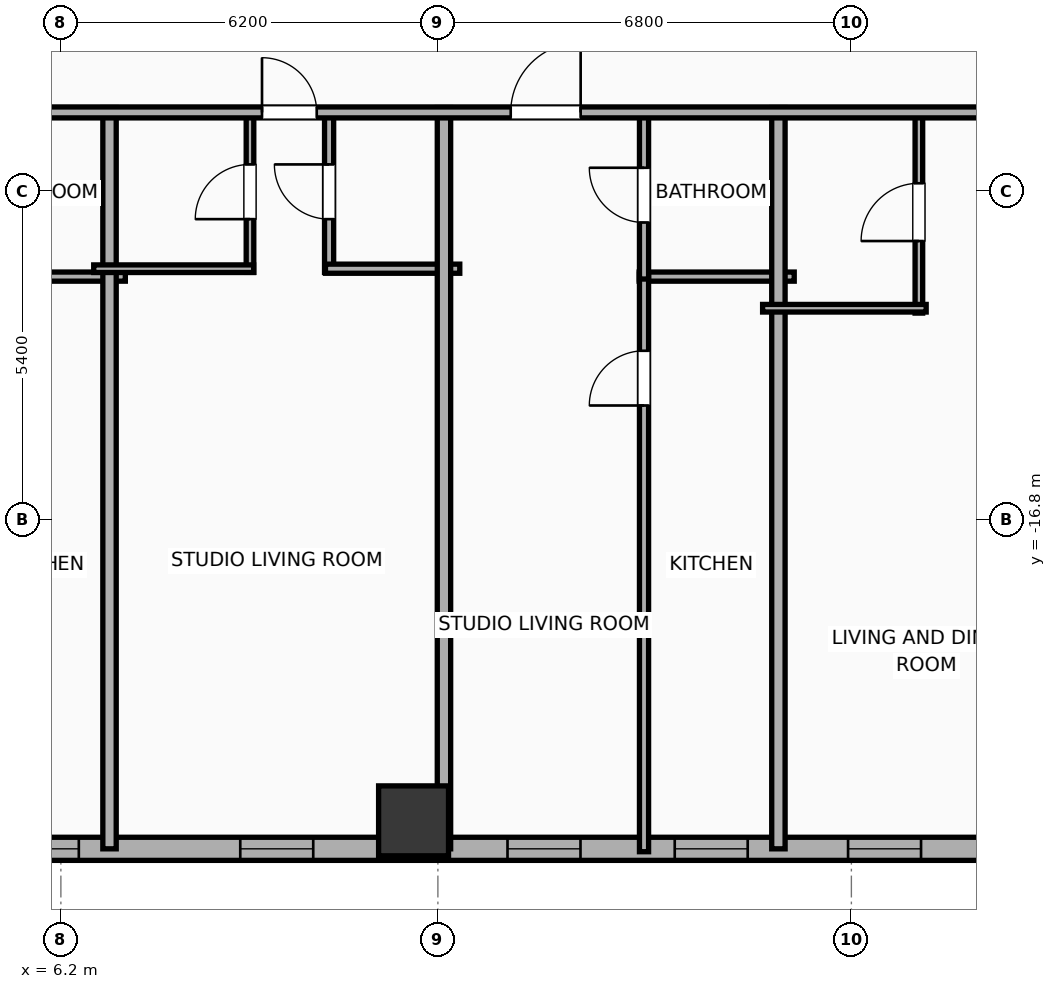
"""IFC4 building model, lengths in metres.
Left out: names, types, materials, properties, quantities, classifications, styles, units other than length and angle.
Written with IfcOpenShell. Run it as: python <this file> out.ifc"""

import sys

from ifc_helpers import new_model, si_unit, direction, frame, frame_2d, origin, origin_2d, place, context, subcontext, project, spatial, rectangle, hollow_rectangle, extrude, element, fill, save


model = new_model("IFC4")
c1 = context("Model", 3, precision=1e-05, world=origin(), true_north=direction((0.0, 1.0)))
c2 = subcontext(c1, "Body", "Model", "MODEL_VIEW")
j1 = project(units=[si_unit("LENGTHUNIT", "METRE"), si_unit("PLANEANGLEUNIT", "RADIAN")], contexts=[c1])
p1 = place(None, origin())
s1 = spatial("IfcSite", under=j1, at=p1, CompositionType="ELEMENT")
p2 = place(p1, origin())
s2 = spatial("IfcBuilding", under=s1, at=p2, CompositionType="ELEMENT")
p3 = place(p2, frame((0.0, 0.0, 33.8)))
s3 = spatial("IfcBuildingStorey", under=s2, at=p3, CompositionType="ELEMENT", Elevation=33.8)
p4 = place(p3, frame((12.0, -21.75, 0.0), z_axis=(0.0, 0.0, 1.0), x_axis=(1.0, 0.0, 0.0)))
e1 = element("IfcColumn", 1, at=p4, inside=s3, PredefinedType="COLUMN", context=c2, shape_type="SweptSolid", body=[
    extrude(hollow_rectangle(XDim=1.15, YDim=1.15, WallThickness=0.04, at=origin_2d()), origin(), (0.0, 0.0, 1.0), 3.9),
])
p5 = place(p3, frame((22.381, -22.21, 0.0), z_axis=(0.0, 0.0, 1.0), x_axis=(-1.0, 0.0, 0.0)))
e2 = element("IfcWall", 2, at=p5, inside=s3, PredefinedType="ELEMENTEDWALL", context=c2, shape_type="SweptSolid", body=[
    extrude(rectangle(XDim=51.963, YDim=0.38, at=frame_2d((25.981, 0.0))), origin(), (0.0, 0.0, 1.0), 3.65),
])
p6 = place(p5, frame((49.127, 0.0, 0.75)))
e3 = element("IfcOpeningElement", 3, at=p6, cuts=e2, PredefinedType="OPENING", context=c2, shape_type="SweptSolid", body=[
    extrude(rectangle(XDim=1.2, YDim=2.05, at=frame_2d((0.6, 1.025))), frame((0.0, 0.2, 0.0), z_axis=(0.0, -1.0, 0.0), x_axis=(1.0, 0.0, 0.0)), (0.0, 0.0, 1.0), 0.4),
])
p7 = place(p5, frame((43.926, 0.0, 0.75)))
e4 = element("IfcOpeningElement", 4, at=p7, cuts=e2, PredefinedType="OPENING", context=c2, shape_type="SweptSolid", body=[
    extrude(rectangle(XDim=1.2, YDim=2.05, at=frame_2d((0.6, 1.025))), frame((0.0, 0.2, 0.0), z_axis=(0.0, -1.0, 0.0), x_axis=(1.0, 0.0, 0.0)), (0.0, 0.0, 1.0), 0.4),
])
p8 = place(p5, frame((46.676, 0.0, 0.75)))
e5 = element("IfcOpeningElement", 5, at=p8, cuts=e2, PredefinedType="OPENING", context=c2, shape_type="SweptSolid", body=[
    extrude(rectangle(XDim=1.2, YDim=2.05, at=frame_2d((0.6, 1.025))), frame((0.0, 0.2, 0.0), z_axis=(0.0, -1.0, 0.0), x_axis=(1.0, 0.0, 0.0)), (0.0, 0.0, 1.0), 0.4),
])
p9 = place(p5, frame((39.531, 0.0, 0.75)))
e6 = element("IfcOpeningElement", 6, at=p9, cuts=e2, PredefinedType="OPENING", context=c2, shape_type="SweptSolid", body=[
    extrude(rectangle(XDim=1.2, YDim=2.05, at=frame_2d((0.6, 1.025))), frame((0.0, 0.2, 0.0), z_axis=(0.0, -1.0, 0.0), x_axis=(1.0, 0.0, 0.0)), (0.0, 0.0, 1.0), 0.4),
])
p10 = place(p5, frame((32.926, 0.0, 0.75)))
e7 = element("IfcOpeningElement", 7, at=p10, cuts=e2, PredefinedType="OPENING", context=c2, shape_type="SweptSolid", body=[
    extrude(rectangle(XDim=1.2, YDim=2.05, at=frame_2d((0.6, 1.025))), frame((0.0, 0.2, 0.0), z_axis=(0.0, -1.0, 0.0), x_axis=(1.0, 0.0, 0.0)), (0.0, 0.0, 1.0), 0.4),
])
p11 = place(p5, frame((35.676, 0.0, 0.75)))
e8 = element("IfcOpeningElement", 8, at=p11, cuts=e2, PredefinedType="OPENING", context=c2, shape_type="SweptSolid", body=[
    extrude(rectangle(XDim=1.2, YDim=2.05, at=frame_2d((0.6, 1.025))), frame((0.0, 0.2, 0.0), z_axis=(0.0, -1.0, 0.0), x_axis=(1.0, 0.0, 0.0)), (0.0, 0.0, 1.0), 0.4),
])
p12 = place(p5, frame((28.531, 0.0, 0.75)))
e9 = element("IfcOpeningElement", 9, at=p12, cuts=e2, PredefinedType="OPENING", context=c2, shape_type="SweptSolid", body=[
    extrude(rectangle(XDim=1.2, YDim=2.05, at=frame_2d((0.6, 1.025))), frame((0.0, 0.2, 0.0), z_axis=(0.0, -1.0, 0.0), x_axis=(1.0, 0.0, 0.0)), (0.0, 0.0, 1.0), 0.4),
])
p13 = place(p5, frame((21.926, 0.0, 0.75)))
e10 = element("IfcOpeningElement", 10, at=p13, cuts=e2, PredefinedType="OPENING", context=c2, shape_type="SweptSolid", body=[
    extrude(rectangle(XDim=1.2, YDim=2.05, at=frame_2d((0.6, 1.025))), frame((0.0, 0.2, 0.0), z_axis=(0.0, -1.0, 0.0), x_axis=(1.0, 0.0, 0.0)), (0.0, 0.0, 1.0), 0.4),
])
p14 = place(p5, frame((24.676, 0.0, 0.75)))
e11 = element("IfcOpeningElement", 11, at=p14, cuts=e2, PredefinedType="OPENING", context=c2, shape_type="SweptSolid", body=[
    extrude(rectangle(XDim=1.2, YDim=2.05, at=frame_2d((0.6, 1.025))), frame((0.0, 0.2, 0.0), z_axis=(0.0, -1.0, 0.0), x_axis=(1.0, 0.0, 0.0)), (0.0, 0.0, 1.0), 0.4),
])
p15 = place(p5, frame((18.636, 0.0, 0.75)))
e12 = element("IfcOpeningElement", 12, at=p15, cuts=e2, PredefinedType="OPENING", context=c2, shape_type="SweptSolid", body=[
    extrude(rectangle(XDim=1.2, YDim=2.05, at=frame_2d((0.6, 1.025))), frame((0.0, 0.2, 0.0), z_axis=(0.0, -1.0, 0.0), x_axis=(1.0, 0.0, 0.0)), (0.0, 0.0, 1.0), 0.4),
])
p16 = place(p5, frame((15.886, 0.0, 0.75)))
e13 = element("IfcOpeningElement", 13, at=p16, cuts=e2, PredefinedType="OPENING", context=c2, shape_type="SweptSolid", body=[
    extrude(rectangle(XDim=1.2, YDim=2.05, at=frame_2d((0.6, 1.025))), frame((0.0, 0.2, 0.0), z_axis=(0.0, -1.0, 0.0), x_axis=(1.0, 0.0, 0.0)), (0.0, 0.0, 1.0), 0.4),
])
p17 = place(p5, frame((12.031, 0.0, 0.75)))
e14 = element("IfcOpeningElement", 14, at=p17, cuts=e2, PredefinedType="OPENING", context=c2, shape_type="SweptSolid", body=[
    extrude(rectangle(XDim=1.2, YDim=2.05, at=frame_2d((0.6, 1.025))), frame((0.0, 0.2, 0.0), z_axis=(0.0, -1.0, 0.0), x_axis=(1.0, 0.0, 0.0)), (0.0, 0.0, 1.0), 0.4),
])
p18 = place(p5, frame((7.636, 0.0, 0.75)))
e15 = element("IfcOpeningElement", 15, at=p18, cuts=e2, PredefinedType="OPENING", context=c2, shape_type="SweptSolid", body=[
    extrude(rectangle(XDim=1.2, YDim=2.05, at=frame_2d((0.6, 1.025))), frame((0.0, 0.2, 0.0), z_axis=(0.0, -1.0, 0.0), x_axis=(1.0, 0.0, 0.0)), (0.0, 0.0, 1.0), 0.4),
])
p19 = place(p5, frame((4.886, 0.0, 0.75)))
e16 = element("IfcOpeningElement", 16, at=p19, cuts=e2, PredefinedType="OPENING", context=c2, shape_type="SweptSolid", body=[
    extrude(rectangle(XDim=1.2, YDim=2.05, at=frame_2d((0.6, 1.025))), frame((0.0, 0.2, 0.0), z_axis=(0.0, -1.0, 0.0), x_axis=(1.0, 0.0, 0.0)), (0.0, 0.0, 1.0), 0.4),
])
p20 = place(p5, frame((2.036, 0.0, 0.75)))
e17 = element("IfcOpeningElement", 17, at=p20, cuts=e2, PredefinedType="OPENING", context=c2, shape_type="SweptSolid", body=[
    extrude(rectangle(XDim=1.2, YDim=2.05, at=frame_2d((0.6, 1.025))), frame((0.0, 0.2, 0.0), z_axis=(0.0, -1.0, 0.0), x_axis=(1.0, 0.0, 0.0)), (0.0, 0.0, 1.0), 0.4),
])
p21 = place(p3, frame((4.71, -12.8, 0.0), z_axis=(0.0, 0.0, 1.0), x_axis=(1.0, 0.0, 0.0)))
e18 = element("IfcWall", 18, at=p21, inside=s3, PredefinedType="PLUMBINGWALL", context=c2, shape_type="SweptSolid", body=[
    extrude(rectangle(XDim=2.55, YDim=0.15, at=frame_2d((1.275, 0.0))), origin(), (0.0, 0.0, 1.0), 3.65),
])
p22 = place(p3, frame((7.0, -22.21, 0.0), z_axis=(0.0, 0.0, 1.0), x_axis=(0.0, 1.0, 0.0)))
e19 = element("IfcWall", 19, at=p22, inside=s3, PredefinedType="PARTITIONING", context=c2, shape_type="SweptSolid", body=[
    extrude(rectangle(XDim=12.19, YDim=0.22, at=frame_2d((6.095, 0.0))), origin(), (0.0, 0.0, 1.0), 3.65),
])
p23 = place(p3, frame((9.31, -12.73, 0.0), z_axis=(0.0, 0.0, 1.0), x_axis=(0.0, 1.0, 0.0)))
e20 = element("IfcWall", 20, at=p23, inside=s3, PredefinedType="PARTITIONING", context=c2, shape_type="SweptSolid", body=[
    extrude(rectangle(XDim=2.65, YDim=0.125, at=frame_2d((1.325, 0.0))), origin(), (0.0, 0.0, 1.0), 3.65),
])
p24 = place(p23, frame((0.875, 0.0, 0.0)))
e21 = element("IfcOpeningElement", 21, at=p24, cuts=e20, PredefinedType="OPENING", context=c2, shape_type="SweptSolid", body=[
    extrude(rectangle(XDim=0.9, YDim=2.05, at=frame_2d((0.45, 1.025))), frame((0.0, 0.073, 0.0), z_axis=(0.0, -1.0, 0.0), x_axis=(1.0, 0.0, 0.0)), (0.0, 0.0, 1.0), 0.145),
])
p25 = place(p3, frame((10.611, -12.73, 0.0), z_axis=(0.0, 0.0, 1.0), x_axis=(0.0, 1.0, 0.0)))
e22 = element("IfcWall", 22, at=p25, inside=s3, PredefinedType="PLUMBINGWALL", context=c2, shape_type="SweptSolid", body=[
    extrude(rectangle(XDim=2.65, YDim=0.15, at=frame_2d((1.325, 0.0))), origin(), (0.0, 0.0, 1.0), 3.65),
])
p26 = place(p25, frame((0.875, 0.0, 0.0)))
e23 = element("IfcOpeningElement", 23, at=p26, cuts=e22, PredefinedType="OPENING", context=c2, shape_type="SweptSolid", body=[
    extrude(rectangle(XDim=0.9, YDim=2.05, at=frame_2d((0.45, 1.025))), frame((0.0, 0.085, 0.0), z_axis=(0.0, -1.0, 0.0), x_axis=(1.0, 0.0, 0.0)), (0.0, 0.0, 1.0), 0.17),
])
p27 = place(p3, frame((6.74, -12.67, 0.0), z_axis=(0.0, 0.0, 1.0), x_axis=(1.0, 0.0, 0.0)))
e24 = element("IfcWall", 24, at=p27, inside=s3, PredefinedType="PARTITIONING", context=c2, shape_type="SweptSolid", body=[
    extrude(rectangle(XDim=2.63, YDim=0.125, at=frame_2d((1.315, 0.0))), origin(), (0.0, 0.0, 1.0), 3.65),
])
p28 = place(p3, frame((10.551, -12.67, 0.0), z_axis=(0.0, 0.0, 1.0), x_axis=(1.0, 0.0, 0.0)))
e25 = element("IfcWall", 25, at=p28, inside=s3, PredefinedType="PLUMBINGWALL", context=c2, shape_type="SweptSolid", body=[
    extrude(rectangle(XDim=2.209, YDim=0.15, at=frame_2d((1.104, 0.0))), origin(), (0.0, 0.0, 1.0), 3.65),
])
p29 = place(p3, frame((12.5, -22.21, 0.0), z_axis=(0.0, 0.0, 1.0), x_axis=(0.0, 1.0, 0.0)))
e26 = element("IfcWall", 26, at=p29, inside=s3, PredefinedType="PARTITIONING", context=c2, shape_type="SweptSolid", body=[
    extrude(rectangle(XDim=12.19, YDim=0.22, at=frame_2d((6.095, 0.0))), origin(), (0.0, 0.0, 1.0), 2.94),
])
p30 = place(p3, frame((15.71, -12.8, 0.0), z_axis=(0.0, 0.0, 1.0), x_axis=(1.0, 0.0, 0.0)))
e27 = element("IfcWall", 27, at=p30, inside=s3, PredefinedType="PLUMBINGWALL", context=c2, shape_type="SweptSolid", body=[
    extrude(rectangle(XDim=2.55, YDim=0.15, at=frame_2d((1.275, 0.0))), origin(), (0.0, 0.0, 1.0), 3.65),
])
p31 = place(p3, frame((15.79, -22.258, 0.0), z_axis=(0.0, 0.0, 1.0), x_axis=(0.0, 1.0, 0.0)))
e28 = element("IfcWall", 28, at=p31, inside=s3, PredefinedType="PLUMBINGWALL", context=c2, shape_type="SweptSolid", body=[
    extrude(rectangle(XDim=9.498, YDim=0.15, at=frame_2d((4.749, 0.0))), origin(), (0.0, 0.0, 1.0), 3.65),
])
p32 = place(p31, frame((7.338, 0.0, 0.0)))
e29 = element("IfcOpeningElement", 29, at=p32, cuts=e28, PredefinedType="OPENING", context=c2, shape_type="SweptSolid", body=[
    extrude(rectangle(XDim=0.9, YDim=2.05, at=frame_2d((0.45, 1.025))), frame((0.0, 0.085, 0.0), z_axis=(0.0, -1.0, 0.0), x_axis=(1.0, 0.0, 0.0)), (0.0, 0.0, 1.0), 0.17),
])
p33 = place(p3, frame((15.79, -12.84, 0.0), z_axis=(0.0, 0.0, 1.0), x_axis=(0.0, 1.0, 0.0)))
e30 = element("IfcWall", 30, at=p33, inside=s3, PredefinedType="PLUMBINGWALL", context=c2, shape_type="SweptSolid", body=[
    extrude(rectangle(XDim=2.76, YDim=0.15, at=frame_2d((1.38, 0.0))), origin(), (0.0, 0.0, 1.0), 3.65),
])
p34 = place(p33, frame((0.93, 0.0, 0.0)))
e31 = element("IfcOpeningElement", 31, at=p34, cuts=e30, PredefinedType="OPENING", context=c2, shape_type="SweptSolid", body=[
    extrude(rectangle(XDim=0.9, YDim=2.05, at=frame_2d((0.45, 1.025))), frame((0.0, 0.085, 0.0), z_axis=(0.0, -1.0, 0.0), x_axis=(1.0, 0.0, 0.0)), (0.0, 0.0, 1.0), 0.17),
])
p35 = place(p3, frame((18.0, -22.21, 0.0), z_axis=(0.0, 0.0, 1.0), x_axis=(0.0, 1.0, 0.0)))
e32 = element("IfcWall", 32, at=p35, inside=s3, PredefinedType="PARTITIONING", context=c2, shape_type="SweptSolid", body=[
    extrude(rectangle(XDim=12.19, YDim=0.22, at=frame_2d((6.095, 0.0))), origin(), (0.0, 0.0, 1.0), 3.65),
])
p36 = place(p3, frame((20.31, -13.4, 0.0), z_axis=(0.0, 0.0, 1.0), x_axis=(0.0, 1.0, 0.0)))
e33 = element("IfcWall", 33, at=p36, inside=s3, PredefinedType="PARTITIONING", context=c2, shape_type="SweptSolid", body=[
    extrude(rectangle(XDim=3.32, YDim=0.125, at=frame_2d((1.66, 0.0))), origin(), (0.0, 0.0, 1.0), 2.94),
])
p37 = place(p36, frame((1.185, 0.0, 0.0)))
e34 = element("IfcOpeningElement", 34, at=p37, cuts=e33, PredefinedType="OPENING", context=c2, shape_type="SweptSolid", body=[
    extrude(rectangle(XDim=0.95, YDim=2.05, at=frame_2d((0.475, 1.025))), frame((0.0, 0.073, 0.0), z_axis=(0.0, -1.0, 0.0), x_axis=(1.0, 0.0, 0.0)), (0.0, 0.0, 1.0), 0.145),
])
p38 = place(p3, frame((17.74, -13.32, 0.0), z_axis=(0.0, 0.0, 1.0), x_axis=(1.0, 0.0, 0.0)))
e35 = element("IfcWall", 35, at=p38, inside=s3, PredefinedType="PARTITIONING", context=c2, shape_type="SweptSolid", body=[
    extrude(rectangle(XDim=2.69, YDim=0.125, at=frame_2d((1.345, 0.0))), origin(), (0.0, 0.0, 1.0), 3.65),
])
p39 = place(p3, frame((-33.41, -10.1, 0.0), z_axis=(0.0, 0.0, 1.0), x_axis=(1.0, 0.0, 0.0)))
e36 = element("IfcWall", 36, at=p39, inside=s3, PredefinedType="PARTITIONING", context=c2, shape_type="SweptSolid", body=[
    extrude(rectangle(XDim=59.62, YDim=0.18, at=frame_2d((29.81, 0.0))), origin(), (0.0, 0.0, 1.0), 3.65),
])
p40 = place(p39, frame((3.259, 0.0, 0.0)))
e37 = element("IfcOpeningElement", 37, at=p40, cuts=e36, PredefinedType="OPENING", context=c2, shape_type="SweptSolid", body=[
    extrude(rectangle(XDim=1.15, YDim=2.05, at=frame_2d((0.575, 1.025))), frame((0.0, 0.1, 0.0), z_axis=(0.0, -1.0, 0.0), x_axis=(1.0, 0.0, 0.0)), (0.0, 0.0, 1.0), 0.2),
])
p41 = place(p39, frame((10.657, 0.0, 0.0)))
e38 = element("IfcOpeningElement", 38, at=p41, cuts=e36, PredefinedType="OPENING", context=c2, shape_type="SweptSolid", body=[
    extrude(rectangle(XDim=1.15, YDim=2.05, at=frame_2d((0.575, 1.025))), frame((0.0, 0.1, 0.0), z_axis=(0.0, -1.0, 0.0), x_axis=(1.0, 0.0, 0.0)), (0.0, 0.0, 1.0), 0.2),
])
p42 = place(p39, frame((15.421, 0.0, 0.0)))
e39 = element("IfcOpeningElement", 39, at=p42, cuts=e36, PredefinedType="OPENING", context=c2, shape_type="SweptSolid", body=[
    extrude(rectangle(XDim=0.9, YDim=2.05, at=frame_2d((0.45, 1.025))), frame((0.0, 0.1, 0.0), z_axis=(0.0, -1.0, 0.0), x_axis=(1.0, 0.0, 0.0)), (0.0, 0.0, 1.0), 0.2),
])
p43 = place(p39, frame((21.657, 0.0, 0.0)))
e40 = element("IfcOpeningElement", 40, at=p43, cuts=e36, PredefinedType="OPENING", context=c2, shape_type="SweptSolid", body=[
    extrude(rectangle(XDim=1.15, YDim=2.05, at=frame_2d((0.575, 1.025))), frame((0.0, 0.1, 0.0), z_axis=(0.0, -1.0, 0.0), x_axis=(1.0, 0.0, 0.0)), (0.0, 0.0, 1.0), 0.2),
])
p44 = place(p39, frame((26.421, 0.0, 0.0)))
e41 = element("IfcOpeningElement", 41, at=p44, cuts=e36, PredefinedType="OPENING", context=c2, shape_type="SweptSolid", body=[
    extrude(rectangle(XDim=0.9, YDim=2.05, at=frame_2d((0.45, 1.025))), frame((0.0, 0.1, 0.0), z_axis=(0.0, -1.0, 0.0), x_axis=(1.0, 0.0, 0.0)), (0.0, 0.0, 1.0), 0.2),
])
p45 = place(p39, frame((32.657, 0.0, 0.0)))
e42 = element("IfcOpeningElement", 42, at=p45, cuts=e36, PredefinedType="OPENING", context=c2, shape_type="SweptSolid", body=[
    extrude(rectangle(XDim=1.15, YDim=2.05, at=frame_2d((0.575, 1.025))), frame((0.0, 0.1, 0.0), z_axis=(0.0, -1.0, 0.0), x_axis=(1.0, 0.0, 0.0)), (0.0, 0.0, 1.0), 0.2),
])
p46 = place(p39, frame((36.008, 0.0, 0.0)))
e43 = element("IfcOpeningElement", 43, at=p46, cuts=e36, PredefinedType="OPENING", context=c2, shape_type="SweptSolid", body=[
    extrude(rectangle(XDim=1.15, YDim=2.05, at=frame_2d((0.575, 1.025))), frame((0.0, 0.1, 0.0), z_axis=(0.0, -1.0, 0.0), x_axis=(1.0, 0.0, 0.0)), (0.0, 0.0, 1.0), 0.2),
])
p47 = place(p39, frame((42.917, 0.0, 0.0)))
e44 = element("IfcOpeningElement", 44, at=p47, cuts=e36, PredefinedType="OPENING", context=c2, shape_type="SweptSolid", body=[
    extrude(rectangle(XDim=0.9, YDim=2.05, at=frame_2d((0.45, 1.025))), frame((0.0, 0.1, 0.0), z_axis=(0.0, -1.0, 0.0), x_axis=(1.0, 0.0, 0.0)), (0.0, 0.0, 1.0), 0.2),
])
p48 = place(p39, frame((47.008, 0.0, 0.0)))
e45 = element("IfcOpeningElement", 45, at=p48, cuts=e36, PredefinedType="OPENING", context=c2, shape_type="SweptSolid", body=[
    extrude(rectangle(XDim=1.15, YDim=2.05, at=frame_2d((0.575, 1.025))), frame((0.0, 0.1, 0.0), z_axis=(0.0, -1.0, 0.0), x_axis=(1.0, 0.0, 0.0)), (0.0, 0.0, 1.0), 0.2),
])
p49 = place(p39, frame((55.14, 0.0, 0.0)))
e46 = element("IfcOpeningElement", 46, at=p49, cuts=e36, PredefinedType="OPENING", context=c2, shape_type="SweptSolid", body=[
    extrude(rectangle(XDim=1.15, YDim=2.05, at=frame_2d((0.575, 1.025))), frame((0.0, 0.1, 0.0), z_axis=(0.0, -1.0, 0.0), x_axis=(1.0, 0.0, 0.0)), (0.0, 0.0, 1.0), 0.2),
])
p50 = place(p16, origin())
e47 = element("IfcWindow", 47, at=p50, inside=s3, PartitioningType="SINGLE_PANEL", PredefinedType="WINDOW", context=c2, shape_type="SweptSolid", body=[
    extrude(rectangle(XDim=1.2, YDim=2.05, at=frame_2d((0.6, 1.025))), frame((0.0, 0.03, 0.0), z_axis=(0.0, -1.0, 0.0), x_axis=(1.0, 0.0, 0.0)), (0.0, 0.0, 1.0), 0.06),
])
fill(e13, e47)
p51 = place(p17, origin())
e48 = element("IfcWindow", 48, at=p51, inside=s3, PartitioningType="SINGLE_PANEL", PredefinedType="WINDOW", context=c2, shape_type="SweptSolid", body=[
    extrude(rectangle(XDim=1.2, YDim=2.05, at=frame_2d((0.6, 1.025))), frame((0.0, 0.03, 0.0), z_axis=(0.0, -1.0, 0.0), x_axis=(1.0, 0.0, 0.0)), (0.0, 0.0, 1.0), 0.06),
])
fill(e14, e48)
p52 = place(p18, origin())
e49 = element("IfcWindow", 49, at=p52, inside=s3, PartitioningType="SINGLE_PANEL", PredefinedType="WINDOW", context=c2, shape_type="SweptSolid", body=[
    extrude(rectangle(XDim=1.2, YDim=2.05, at=frame_2d((0.6, 1.025))), frame((0.0, 0.03, 0.0), z_axis=(0.0, -1.0, 0.0), x_axis=(1.0, 0.0, 0.0)), (0.0, 0.0, 1.0), 0.06),
])
fill(e15, e49)
p53 = place(p19, origin())
e50 = element("IfcWindow", 50, at=p53, inside=s3, PartitioningType="SINGLE_PANEL", PredefinedType="WINDOW", context=c2, shape_type="SweptSolid", body=[
    extrude(rectangle(XDim=1.2, YDim=2.05, at=frame_2d((0.6, 1.025))), frame((0.0, 0.03, 0.0), z_axis=(0.0, -1.0, 0.0), x_axis=(1.0, 0.0, 0.0)), (0.0, 0.0, 1.0), 0.06),
])
fill(e16, e50)
p54 = place(p20, origin())
e51 = element("IfcWindow", 51, at=p54, inside=s3, PartitioningType="SINGLE_PANEL", PredefinedType="WINDOW", context=c2, shape_type="SweptSolid", body=[
    extrude(rectangle(XDim=1.2, YDim=2.05, at=frame_2d((0.6, 1.025))), frame((0.0, 0.03, 0.0), z_axis=(0.0, -1.0, 0.0), x_axis=(1.0, 0.0, 0.0)), (0.0, 0.0, 1.0), 0.06),
])
fill(e17, e51)
p55 = place(p24, origin())
e52 = element("IfcDoor", 52, at=p55, inside=s3, OperationType="SINGLE_SWING_LEFT", PredefinedType="DOOR", context=c2, shape_type="SweptSolid", body=[
    extrude(rectangle(XDim=0.9, YDim=2.05, at=frame_2d((0.45, 1.025))), frame((0.0, 0.025, 0.0), z_axis=(0.0, -1.0, 0.0), x_axis=(1.0, 0.0, 0.0)), (0.0, 0.0, 1.0), 0.05),
])
fill(e21, e52)
p56 = place(p26, origin())
e53 = element("IfcDoor", 53, at=p56, inside=s3, OperationType="SINGLE_SWING_RIGHT", PredefinedType="DOOR", context=c2, shape_type="SweptSolid", body=[
    extrude(rectangle(XDim=0.9, YDim=2.05, at=frame_2d((0.45, 1.025))), frame((0.0, 0.025, 0.0), z_axis=(0.0, -1.0, 0.0), x_axis=(1.0, 0.0, 0.0)), (0.0, 0.0, 1.0), 0.05),
])
fill(e23, e53)
p57 = place(p32, origin())
e54 = element("IfcDoor", 54, at=p57, inside=s3, OperationType="SINGLE_SWING_LEFT", PredefinedType="DOOR", context=c2, shape_type="SweptSolid", body=[
    extrude(rectangle(XDim=0.9, YDim=2.05, at=frame_2d((0.45, 1.025))), frame((0.0, 0.025, 0.0), z_axis=(0.0, -1.0, 0.0), x_axis=(1.0, 0.0, 0.0)), (0.0, 0.0, 1.0), 0.05),
])
fill(e29, e54)
p58 = place(p34, origin())
e55 = element("IfcDoor", 55, at=p58, inside=s3, OperationType="SINGLE_SWING_RIGHT", PredefinedType="DOOR", context=c2, shape_type="SweptSolid", body=[
    extrude(rectangle(XDim=0.9, YDim=2.05, at=frame_2d((0.45, 1.025))), frame((0.0, 0.025, 0.0), z_axis=(0.0, -1.0, 0.0), x_axis=(1.0, 0.0, 0.0)), (0.0, 0.0, 1.0), 0.05),
])
fill(e31, e55)
p59 = place(p37, origin())
e56 = element("IfcDoor", 56, at=p59, inside=s3, OperationType="SINGLE_SWING_LEFT", PredefinedType="DOOR", context=c2, shape_type="SweptSolid", body=[
    extrude(rectangle(XDim=0.95, YDim=2.05, at=frame_2d((0.475, 1.025))), frame((0.0, 0.025, 0.0), z_axis=(0.0, -1.0, 0.0), x_axis=(1.0, 0.0, 0.0)), (0.0, 0.0, 1.0), 0.05),
])
fill(e34, e56)
p60 = place(p47, origin())
e57 = element("IfcDoor", 57, at=p60, inside=s3, OperationType="SINGLE_SWING_LEFT", PredefinedType="DOOR", context=c2, shape_type="SweptSolid", body=[
    extrude(rectangle(XDim=0.9, YDim=2.05, at=frame_2d((0.45, 1.025))), frame((0.0, 0.025, 0.0), z_axis=(0.0, -1.0, 0.0), x_axis=(1.0, 0.0, 0.0)), (0.0, 0.0, 1.0), 0.05),
])
fill(e44, e57)
p61 = place(p48, origin())
e58 = element("IfcDoor", 58, at=p61, inside=s3, OperationType="SINGLE_SWING_RIGHT", PredefinedType="DOOR", context=c2, shape_type="SweptSolid", body=[
    extrude(rectangle(XDim=1.15, YDim=2.05, at=frame_2d((0.575, 1.025))), frame((0.0, 0.025, 0.0), z_axis=(0.0, -1.0, 0.0), x_axis=(1.0, 0.0, 0.0)), (0.0, 0.0, 1.0), 0.05),
])
fill(e45, e58)
save(model, sys.argv[1])
